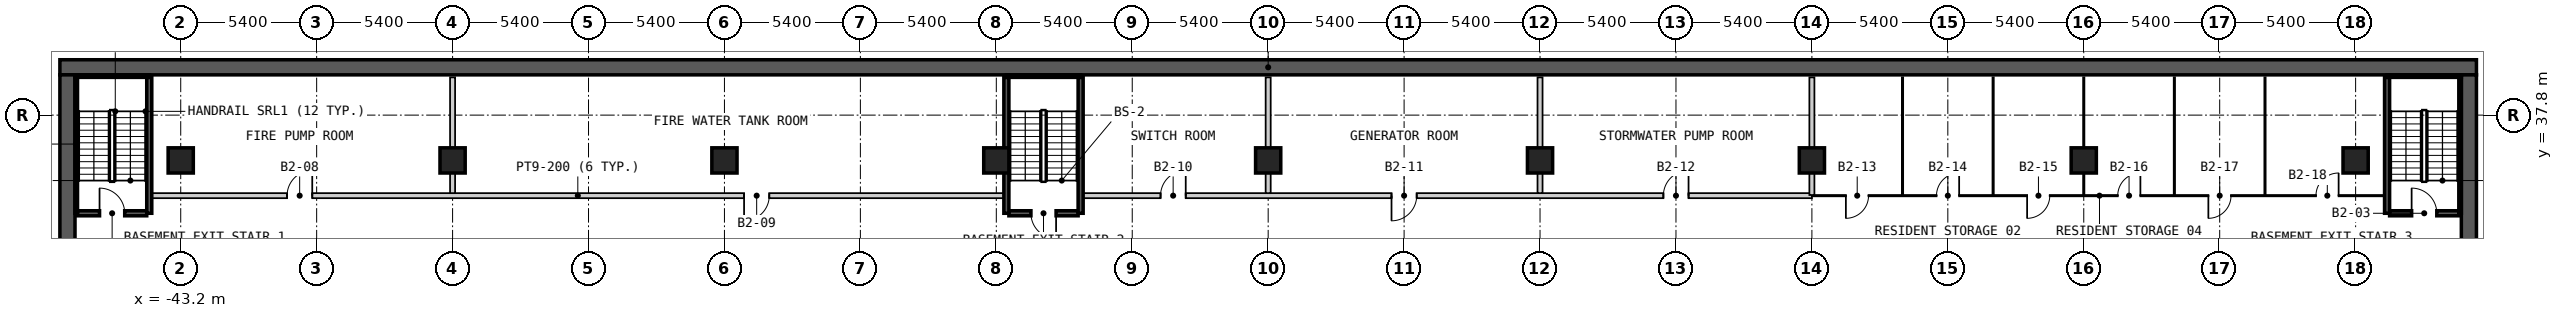
"""IFC4 building model, lengths in metres.
Left out: names, types, materials, properties, quantities, classifications, styles, units other than length and angle.
Written with IfcOpenShell. Run it as: python <this file> out.ifc"""

import sys

from ifc_helpers import new_model, si_unit, direction, frame, frame_2d, origin, origin_2d, place, context, subcontext, project, spatial, rectangle, extrude, element, fill, save


model = new_model("IFC4")
c1 = context("Model", 3, precision=1e-05, world=origin(), true_north=direction((0.0, 1.0)))
c2 = subcontext(c1, "Body", "Model", "MODEL_VIEW")
j1 = project(units=[si_unit("LENGTHUNIT", "METRE"), si_unit("PLANEANGLEUNIT", "RADIAN")], contexts=[c1])
p1 = place(None, origin())
s1 = spatial("IfcSite", under=j1, at=p1, CompositionType="ELEMENT")
p2 = place(p1, origin())
s2 = spatial("IfcBuilding", under=s1, at=p2, CompositionType="ELEMENT")
p3 = place(p2, frame((0.0, 0.0, -8.4)))
s3 = spatial("IfcBuildingStorey", under=s2, at=p3, CompositionType="ELEMENT", Elevation=-8.4)
p4 = place(p3, frame((-48.0, 39.7, -0.35), z_axis=(0.0, 0.0, 1.0), x_axis=(1.0, 0.0, 0.0)))
e1 = element("IfcWall", 1, at=p4, inside=s3, PredefinedType="SOLIDWALL", context=c2, shape_type="SweptSolid", body=[
    extrude(rectangle(XDim=96.0, YDim=0.6, at=frame_2d((48.0, 0.0))), origin(), (0.0, 0.0, 1.0), 4.55),
])
for number, where, z_axis, x_axis in (
    (2, (-47.7, -31.4, -0.35), (0.0, 0.0, 1.0), (0.0, 1.0, 0.0)),
    (3, (47.7, -31.4, -0.35), (0.0, 0.0, 1.0), (0.0, 1.0, 0.0)),
):
    element("IfcWall", number, at=place(p3, frame(where, z_axis=z_axis, x_axis=x_axis)), inside=s3, PredefinedType="SOLIDWALL", context=c2, shape_type="SweptSolid", body=[
        extrude(rectangle(XDim=70.8, YDim=0.6, at=frame_2d((35.4, 0.0))), origin(), (0.0, 0.0, 1.0), 4.55),
    ])
for number, where, z_axis, x_axis in (
    (4, (-43.2, 36.0, -0.35), (0.0, 0.0, 1.0), (1.0, 0.0, 0.0)),
    (5, (-32.4, 36.0, -0.35), (0.0, 0.0, 1.0), (1.0, 0.0, 0.0)),
    (6, (-21.6, 36.0, -0.35), (0.0, 0.0, 1.0), (1.0, 0.0, 0.0)),
    (7, (-10.8, 36.0, -0.35), (0.0, 0.0, 1.0), (1.0, 0.0, 0.0)),
    (8, (0.0, 36.0, -0.35), (0.0, 0.0, 1.0), (1.0, 0.0, 0.0)),
    (9, (10.8, 36.0, -0.35), (0.0, 0.0, 1.0), (1.0, 0.0, 0.0)),
    (10, (21.6, 36.0, -0.35), (0.0, 0.0, 1.0), (1.0, 0.0, 0.0)),
    (11, (32.4, 36.0, -0.35), (0.0, 0.0, 1.0), (1.0, 0.0, 0.0)),
    (12, (43.2, 36.0, -0.35), (0.0, 0.0, 1.0), (1.0, 0.0, 0.0)),
):
    element("IfcColumn", number, at=place(p3, frame(where, z_axis=z_axis, x_axis=x_axis)), inside=s3, PredefinedType="COLUMN", context=c2, shape_type="SweptSolid", body=[
        extrude(rectangle(XDim=1.0, YDim=1.0, at=origin_2d()), origin(), (0.0, 0.0, 1.0), 4.55),
    ])
p5 = place(p3, frame((-47.3, 33.9, 0.0), z_axis=(0.0, 0.0, 1.0), x_axis=(1.0, 0.0, 0.0)))
e13 = element("IfcWall", 13, at=p5, inside=s3, PredefinedType="SOLIDWALL", context=c2, shape_type="SweptSolid", body=[
    extrude(rectangle(XDim=2.75, YDim=0.2, at=frame_2d((1.375, 0.0))), origin(), (0.0, 0.0, 1.0), 3.85),
])
p6 = place(p5, frame((0.875, 0.0, 0.0)))
e14 = element("IfcOpeningElement", 14, at=p6, cuts=e13, PredefinedType="OPENING", context=c2, shape_type="SweptSolid", body=[
    extrude(rectangle(XDim=1.0, YDim=2.1, at=frame_2d((0.5, 1.05))), frame((0.0, 0.11, 0.0), z_axis=(0.0, -1.0, 0.0), x_axis=(1.0, 0.0, 0.0)), (0.0, 0.0, 1.0), 0.22),
])
p7 = place(p3, frame((-10.3, 33.9, 0.0), z_axis=(0.0, 0.0, 1.0), x_axis=(1.0, 0.0, 0.0)))
e15 = element("IfcWall", 15, at=p7, inside=s3, PredefinedType="SOLIDWALL", context=c2, shape_type="SweptSolid", body=[
    extrude(rectangle(XDim=2.75, YDim=0.2, at=frame_2d((1.375, 0.0))), origin(), (0.0, 0.0, 1.0), 3.85),
])
p8 = place(p7, frame((0.875, 0.0, 0.0)))
e16 = element("IfcOpeningElement", 16, at=p8, cuts=e15, PredefinedType="OPENING", context=c2, shape_type="SweptSolid", body=[
    extrude(rectangle(XDim=1.0, YDim=2.1, at=frame_2d((0.5, 1.05))), frame((0.0, 0.11, 0.0), z_axis=(0.0, -1.0, 0.0), x_axis=(1.0, 0.0, 0.0)), (0.0, 0.0, 1.0), 0.22),
])
p9 = place(p3, frame((44.55, 33.9, 0.0), z_axis=(0.0, 0.0, 1.0), x_axis=(1.0, 0.0, 0.0)))
e17 = element("IfcWall", 17, at=p9, inside=s3, PredefinedType="SOLIDWALL", context=c2, shape_type="SweptSolid", body=[
    extrude(rectangle(XDim=2.75, YDim=0.2, at=frame_2d((1.375, 0.0))), origin(), (0.0, 0.0, 1.0), 3.85),
])
p10 = place(p9, frame((0.875, 0.0, 0.0)))
e18 = element("IfcOpeningElement", 18, at=p10, cuts=e17, PredefinedType="OPENING", context=c2, shape_type="SweptSolid", body=[
    extrude(rectangle(XDim=1.0, YDim=2.1, at=frame_2d((0.5, 1.05))), frame((0.0, 0.11, 0.0), z_axis=(0.0, -1.0, 0.0), x_axis=(1.0, 0.0, 0.0)), (0.0, 0.0, 1.0), 0.22),
])
p11 = place(p3, frame((21.6, 34.6, 0.0), z_axis=(0.0, 0.0, 1.0), x_axis=(1.0, 0.0, 0.0)))
e19 = element("IfcWall", 19, at=p11, inside=s3, PredefinedType="PARTITIONING", context=c2, shape_type="SweptSolid", body=[
    extrude(rectangle(XDim=22.85, YDim=0.05, at=frame_2d((11.425, 0.0))), origin(), (0.0, 0.0, 1.0), 3.85),
])
p12 = place(p11, frame((2.25, 0.0, 0.0), z_axis=(0.0, 0.0, 1.0), x_axis=(-1.0, 0.0, 0.0)))
e20 = element("IfcOpeningElement", 20, at=p12, cuts=e19, PredefinedType="OPENING", context=c2, shape_type="SweptSolid", body=[
    extrude(rectangle(XDim=0.9, YDim=2.1, at=frame_2d((0.45, 1.05))), frame((0.0, 0.035, 0.0), z_axis=(0.0, -1.0, 0.0), x_axis=(1.0, 0.0, 0.0)), (0.0, 0.0, 1.0), 0.07),
])
p13 = place(p11, frame((5.85, 0.0, 0.0), z_axis=(0.0, 0.0, 1.0), x_axis=(-1.0, 0.0, 0.0)))
e21 = element("IfcOpeningElement", 21, at=p13, cuts=e19, PredefinedType="OPENING", context=c2, shape_type="SweptSolid", body=[
    extrude(rectangle(XDim=0.9, YDim=2.1, at=frame_2d((0.45, 1.05))), frame((0.0, 0.035, 0.0), z_axis=(0.0, -1.0, 0.0), x_axis=(1.0, 0.0, 0.0)), (0.0, 0.0, 1.0), 0.07),
])
p14 = place(p11, frame((9.45, 0.0, 0.0), z_axis=(0.0, 0.0, 1.0), x_axis=(-1.0, 0.0, 0.0)))
e22 = element("IfcOpeningElement", 22, at=p14, cuts=e19, PredefinedType="OPENING", context=c2, shape_type="SweptSolid", body=[
    extrude(rectangle(XDim=0.9, YDim=2.1, at=frame_2d((0.45, 1.05))), frame((0.0, 0.035, 0.0), z_axis=(0.0, -1.0, 0.0), x_axis=(1.0, 0.0, 0.0)), (0.0, 0.0, 1.0), 0.07),
])
p15 = place(p11, frame((13.05, 0.0, 0.0), z_axis=(0.0, 0.0, 1.0), x_axis=(-1.0, 0.0, 0.0)))
e23 = element("IfcOpeningElement", 23, at=p15, cuts=e19, PredefinedType="OPENING", context=c2, shape_type="SweptSolid", body=[
    extrude(rectangle(XDim=0.9, YDim=2.1, at=frame_2d((0.45, 1.05))), frame((0.0, 0.035, 0.0), z_axis=(0.0, -1.0, 0.0), x_axis=(1.0, 0.0, 0.0)), (0.0, 0.0, 1.0), 0.07),
])
p16 = place(p11, frame((16.65, 0.0, 0.0), z_axis=(0.0, 0.0, 1.0), x_axis=(-1.0, 0.0, 0.0)))
e24 = element("IfcOpeningElement", 24, at=p16, cuts=e19, PredefinedType="OPENING", context=c2, shape_type="SweptSolid", body=[
    extrude(rectangle(XDim=0.9, YDim=2.1, at=frame_2d((0.45, 1.05))), frame((0.0, 0.035, 0.0), z_axis=(0.0, -1.0, 0.0), x_axis=(1.0, 0.0, 0.0)), (0.0, 0.0, 1.0), 0.07),
])
p17 = place(p11, frame((20.925, 0.0, 0.0), z_axis=(0.0, 0.0, 1.0), x_axis=(-1.0, 0.0, 0.0)))
e25 = element("IfcOpeningElement", 25, at=p17, cuts=e19, PredefinedType="OPENING", context=c2, shape_type="SweptSolid", body=[
    extrude(rectangle(XDim=0.9, YDim=2.1, at=frame_2d((0.45, 1.05))), frame((0.0, 0.035, 0.0), z_axis=(0.0, -1.0, 0.0), x_axis=(1.0, 0.0, 0.0)), (0.0, 0.0, 1.0), 0.07),
])
p18 = place(p3, frame((-44.55, 34.6, 0.0), z_axis=(0.0, 0.0, 1.0), x_axis=(1.0, 0.0, 0.0)))
e26 = element("IfcWall", 26, at=p18, inside=s3, PredefinedType="SOLIDWALL", context=c2, shape_type="SweptSolid", body=[
    extrude(rectangle(XDim=34.25, YDim=0.2, at=frame_2d((17.125, 0.0))), origin(), (0.0, 0.0, 1.0), 3.85),
])
p19 = place(p18, frame((6.575, 0.0, 0.0), z_axis=(0.0, 0.0, 1.0), x_axis=(-1.0, 0.0, 0.0)))
e27 = element("IfcOpeningElement", 27, at=p19, cuts=e26, PredefinedType="OPENING", context=c2, shape_type="SweptSolid", body=[
    extrude(rectangle(XDim=1.0, YDim=2.1, at=frame_2d((0.5, 1.05))), frame((0.0, 0.11, 0.0), z_axis=(0.0, -1.0, 0.0), x_axis=(1.0, 0.0, 0.0)), (0.0, 0.0, 1.0), 0.22),
])
p20 = place(p18, frame((24.73, 0.0, 0.0), z_axis=(0.0, 0.0, 1.0), x_axis=(-1.0, 0.0, 0.0)))
e28 = element("IfcOpeningElement", 28, at=p20, cuts=e26, PredefinedType="OPENING", context=c2, shape_type="SweptSolid", body=[
    extrude(rectangle(XDim=1.0, YDim=2.1, at=frame_2d((0.5, 1.05))), frame((0.0, 0.11, 0.0), z_axis=(0.0, -1.0, 0.0), x_axis=(1.0, 0.0, 0.0)), (0.0, 0.0, 1.0), 0.22),
])
p21 = place(p3, frame((-7.55, 34.6, 0.0), z_axis=(0.0, 0.0, 1.0), x_axis=(1.0, 0.0, 0.0)))
e29 = element("IfcWall", 29, at=p21, inside=s3, PredefinedType="SOLIDWALL", context=c2, shape_type="SweptSolid", body=[
    extrude(rectangle(XDim=29.15, YDim=0.2, at=frame_2d((14.575, 0.0))), origin(), (0.0, 0.0, 1.0), 3.85),
])
p22 = place(p21, frame((4.275, 0.0, 0.0), z_axis=(0.0, 0.0, 1.0), x_axis=(-1.0, 0.0, 0.0)))
e30 = element("IfcOpeningElement", 30, at=p22, cuts=e29, PredefinedType="OPENING", context=c2, shape_type="SweptSolid", body=[
    extrude(rectangle(XDim=1.0, YDim=2.1, at=frame_2d((0.5, 1.05))), frame((0.0, 0.11, 0.0), z_axis=(0.0, -1.0, 0.0), x_axis=(1.0, 0.0, 0.0)), (0.0, 0.0, 1.0), 0.22),
])
p23 = place(p21, frame((13.45, 0.0, 0.0), z_axis=(0.0, 0.0, 1.0), x_axis=(-1.0, 0.0, 0.0)))
e31 = element("IfcOpeningElement", 31, at=p23, cuts=e29, PredefinedType="OPENING", context=c2, shape_type="SweptSolid", body=[
    extrude(rectangle(XDim=1.0, YDim=2.1, at=frame_2d((0.5, 1.05))), frame((0.0, 0.11, 0.0), z_axis=(0.0, -1.0, 0.0), x_axis=(1.0, 0.0, 0.0)), (0.0, 0.0, 1.0), 0.22),
])
p24 = place(p21, frame((24.25, 0.0, 0.0), z_axis=(0.0, 0.0, 1.0), x_axis=(-1.0, 0.0, 0.0)))
e32 = element("IfcOpeningElement", 32, at=p24, cuts=e29, PredefinedType="OPENING", context=c2, shape_type="SweptSolid", body=[
    extrude(rectangle(XDim=1.0, YDim=2.1, at=frame_2d((0.5, 1.05))), frame((0.0, 0.11, 0.0), z_axis=(0.0, -1.0, 0.0), x_axis=(1.0, 0.0, 0.0)), (0.0, 0.0, 1.0), 0.22),
])
p25 = place(p3, frame((-44.45, 33.9, 0.0), z_axis=(0.0, 0.0, 1.0), x_axis=(0.0, 1.0, 0.0)))
e33 = element("IfcWall", 33, at=p25, inside=s3, PredefinedType="SOLIDWALL", context=c2, shape_type="SweptSolid", body=[
    extrude(rectangle(XDim=5.4, YDim=0.2, at=frame_2d((2.7, 0.0))), origin(), (0.0, 0.0, 1.0), 3.85),
])
p26 = place(p3, frame((-32.4, 34.7, 0.0), z_axis=(0.0, 0.0, 1.0), x_axis=(0.0, 1.0, 0.0)))
e34 = element("IfcWall", 34, at=p26, inside=s3, PredefinedType="SOLIDWALL", context=c2, shape_type="SweptSolid", body=[
    extrude(rectangle(XDim=4.6, YDim=0.2, at=frame_2d((2.3, 0.0))), origin(), (0.0, 0.0, 1.0), 3.85),
])
for number, where, z_axis, x_axis in (
    (35, (-10.4, 33.9, 0.0), (0.0, 0.0, 1.0), (0.0, 1.0, 0.0)),
    (36, (-7.45, 33.9, 0.0), (0.0, 0.0, 1.0), (0.0, 1.0, 0.0)),
):
    element("IfcWall", number, at=place(p3, frame(where, z_axis=z_axis, x_axis=x_axis)), inside=s3, PredefinedType="SOLIDWALL", context=c2, shape_type="SweptSolid", body=[
        extrude(rectangle(XDim=5.4, YDim=0.2, at=frame_2d((2.7, 0.0))), origin(), (0.0, 0.0, 1.0), 3.85),
    ])
for number, where, z_axis, x_axis in (
    (37, (0.0, 34.7, 0.0), (0.0, 0.0, 1.0), (0.0, 1.0, 0.0)),
    (38, (10.8, 34.7, 0.0), (0.0, 0.0, 1.0), (0.0, 1.0, 0.0)),
):
    element("IfcWall", number, at=place(p3, frame(where, z_axis=z_axis, x_axis=x_axis)), inside=s3, PredefinedType="SOLIDWALL", context=c2, shape_type="SweptSolid", body=[
        extrude(rectangle(XDim=4.6, YDim=0.2, at=frame_2d((2.3, 0.0))), origin(), (0.0, 0.0, 1.0), 3.85),
    ])
p27 = place(p3, frame((21.6, 34.625, 0.0), z_axis=(0.0, 0.0, 1.0), x_axis=(0.0, 1.0, 0.0)))
e39 = element("IfcWall", 39, at=p27, inside=s3, PredefinedType="SOLIDWALL", context=c2, shape_type="SweptSolid", body=[
    extrude(rectangle(XDim=4.675, YDim=0.2, at=frame_2d((2.337, 0.0))), origin(), (0.0, 0.0, 1.0), 3.85),
])
for number, where, z_axis, x_axis in (
    (40, (25.2, 34.625, 0.0), (0.0, 0.0, 1.0), (0.0, 1.0, 0.0)),
    (41, (28.8, 34.625, 0.0), (0.0, 0.0, 1.0), (0.0, 1.0, 0.0)),
    (42, (32.4, 34.625, 0.0), (0.0, 0.0, 1.0), (0.0, 1.0, 0.0)),
    (43, (36.0, 34.625, 0.0), (0.0, 0.0, 1.0), (0.0, 1.0, 0.0)),
    (44, (39.6, 34.625, 0.0), (0.0, 0.0, 1.0), (0.0, 1.0, 0.0)),
):
    element("IfcWall", number, at=place(p3, frame(where, z_axis=z_axis, x_axis=x_axis)), inside=s3, PredefinedType="PARTITIONING", context=c2, shape_type="SweptSolid", body=[
        extrude(rectangle(XDim=4.675, YDim=0.05, at=frame_2d((2.337, 0.0))), origin(), (0.0, 0.0, 1.0), 3.85),
    ])
p28 = place(p3, frame((44.45, 33.9, 0.0), z_axis=(0.0, 0.0, 1.0), x_axis=(0.0, 1.0, 0.0)))
e45 = element("IfcWall", 45, at=p28, inside=s3, PredefinedType="SOLIDWALL", context=c2, shape_type="SweptSolid", body=[
    extrude(rectangle(XDim=5.4, YDim=0.2, at=frame_2d((2.7, 0.0))), origin(), (0.0, 0.0, 1.0), 3.85),
])
p29 = place(p3, frame((-47.35, 33.9, 0.0), z_axis=(0.0, 0.0, 1.0), x_axis=(0.0, 1.0, 0.0)))
e46 = element("IfcWall", 46, at=p29, inside=s3, PredefinedType="SOLIDWALL", context=c2, shape_type="SweptSolid", body=[
    extrude(rectangle(XDim=5.5, YDim=0.1, at=frame_2d((2.75, 0.0))), origin(), (0.0, 0.0, 1.0), 3.85),
])
for number, where, z_axis, x_axis in (
    (47, (-47.4, 39.35, 0.0), (0.0, 0.0, 1.0), (1.0, 0.0, 0.0)),
    (48, (-10.4, 39.35, 0.0), (0.0, 0.0, 1.0), (1.0, 0.0, 0.0)),
):
    element("IfcWall", number, at=place(p3, frame(where, z_axis=z_axis, x_axis=x_axis)), inside=s3, PredefinedType="SOLIDWALL", context=c2, shape_type="SweptSolid", body=[
        extrude(rectangle(XDim=2.95, YDim=0.1, at=frame_2d((1.475, 0.0))), origin(), (0.0, 0.0, 1.0), 3.85),
    ])
p30 = place(p3, frame((47.35, 33.9, 0.0), z_axis=(0.0, 0.0, 1.0), x_axis=(0.0, 1.0, 0.0)))
e49 = element("IfcWall", 49, at=p30, inside=s3, PredefinedType="SOLIDWALL", context=c2, shape_type="SweptSolid", body=[
    extrude(rectangle(XDim=5.5, YDim=0.1, at=frame_2d((2.75, 0.0))), origin(), (0.0, 0.0, 1.0), 3.85),
])
p31 = place(p3, frame((44.45, 39.35, 0.0), z_axis=(0.0, 0.0, 1.0), x_axis=(1.0, 0.0, 0.0)))
e50 = element("IfcWall", 50, at=p31, inside=s3, PredefinedType="SOLIDWALL", context=c2, shape_type="SweptSolid", body=[
    extrude(rectangle(XDim=2.95, YDim=0.1, at=frame_2d((1.475, 0.0))), origin(), (0.0, 0.0, 1.0), 3.85),
])
p32 = place(p6, origin())
e51 = element("IfcDoor", 51, at=p32, inside=s3, OperationType="SINGLE_SWING_LEFT", PredefinedType="DOOR", context=c2, shape_type="SweptSolid", body=[
    extrude(rectangle(XDim=1.0, YDim=2.1, at=frame_2d((0.5, 1.05))), frame((0.0, 0.025, 0.0), z_axis=(0.0, -1.0, 0.0), x_axis=(1.0, 0.0, 0.0)), (0.0, 0.0, 1.0), 0.05),
])
fill(e14, e51)
p33 = place(p8, origin())
e52 = element("IfcDoor", 52, at=p33, inside=s3, OperationType="SINGLE_SWING_RIGHT", PredefinedType="DOOR", context=c2, shape_type="SweptSolid", body=[
    extrude(rectangle(XDim=1.0, YDim=2.1, at=frame_2d((0.5, 1.05))), frame((0.0, 0.025, 0.0), z_axis=(0.0, -1.0, 0.0), x_axis=(1.0, 0.0, 0.0)), (0.0, 0.0, 1.0), 0.05),
])
fill(e16, e52)
p34 = place(p10, origin())
e53 = element("IfcDoor", 53, at=p34, inside=s3, OperationType="SINGLE_SWING_LEFT", PredefinedType="DOOR", context=c2, shape_type="SweptSolid", body=[
    extrude(rectangle(XDim=1.0, YDim=2.1, at=frame_2d((0.5, 1.05))), frame((0.0, 0.025, 0.0), z_axis=(0.0, -1.0, 0.0), x_axis=(1.0, 0.0, 0.0)), (0.0, 0.0, 1.0), 0.05),
])
fill(e18, e53)
p35 = place(p19, origin())
e54 = element("IfcDoor", 54, at=p35, inside=s3, OperationType="SINGLE_SWING_LEFT", PredefinedType="DOOR", context=c2, shape_type="SweptSolid", body=[
    extrude(rectangle(XDim=1.0, YDim=2.1, at=frame_2d((0.5, 1.05))), frame((0.0, 0.025, 0.0), z_axis=(0.0, -1.0, 0.0), x_axis=(1.0, 0.0, 0.0)), (0.0, 0.0, 1.0), 0.05),
])
fill(e27, e54)
p36 = place(p20, origin())
e55 = element("IfcDoor", 55, at=p36, inside=s3, OperationType="SINGLE_SWING_RIGHT", PredefinedType="DOOR", context=c2, shape_type="SweptSolid", body=[
    extrude(rectangle(XDim=1.0, YDim=2.1, at=frame_2d((0.5, 1.05))), frame((0.0, 0.025, 0.0), z_axis=(0.0, -1.0, 0.0), x_axis=(1.0, 0.0, 0.0)), (0.0, 0.0, 1.0), 0.05),
])
fill(e28, e55)
p37 = place(p22, origin())
e56 = element("IfcDoor", 56, at=p37, inside=s3, OperationType="SINGLE_SWING_LEFT", PredefinedType="DOOR", context=c2, shape_type="SweptSolid", body=[
    extrude(rectangle(XDim=1.0, YDim=2.1, at=frame_2d((0.5, 1.05))), frame((0.0, 0.025, 0.0), z_axis=(0.0, -1.0, 0.0), x_axis=(1.0, 0.0, 0.0)), (0.0, 0.0, 1.0), 0.05),
])
fill(e30, e56)
p38 = place(p23, origin())
e57 = element("IfcDoor", 57, at=p38, inside=s3, OperationType="SINGLE_SWING_RIGHT", PredefinedType="DOOR", context=c2, shape_type="SweptSolid", body=[
    extrude(rectangle(XDim=1.0, YDim=2.1, at=frame_2d((0.5, 1.05))), frame((0.0, 0.025, 0.0), z_axis=(0.0, -1.0, 0.0), x_axis=(1.0, 0.0, 0.0)), (0.0, 0.0, 1.0), 0.05),
])
fill(e31, e57)
p39 = place(p24, origin())
e58 = element("IfcDoor", 58, at=p39, inside=s3, OperationType="SINGLE_SWING_LEFT", PredefinedType="DOOR", context=c2, shape_type="SweptSolid", body=[
    extrude(rectangle(XDim=1.0, YDim=2.1, at=frame_2d((0.5, 1.05))), frame((0.0, 0.025, 0.0), z_axis=(0.0, -1.0, 0.0), x_axis=(1.0, 0.0, 0.0)), (0.0, 0.0, 1.0), 0.05),
])
fill(e32, e58)
p40 = place(p12, origin())
e59 = element("IfcDoor", 59, at=p40, inside=s3, OperationType="SINGLE_SWING_RIGHT", PredefinedType="DOOR", context=c2, shape_type="SweptSolid", body=[
    extrude(rectangle(XDim=0.9, YDim=2.1, at=frame_2d((0.45, 1.05))), frame((0.0, 0.025, 0.0), z_axis=(0.0, -1.0, 0.0), x_axis=(1.0, 0.0, 0.0)), (0.0, 0.0, 1.0), 0.05),
])
fill(e20, e59)
p41 = place(p13, origin())
e60 = element("IfcDoor", 60, at=p41, inside=s3, OperationType="SINGLE_SWING_LEFT", PredefinedType="DOOR", context=c2, shape_type="SweptSolid", body=[
    extrude(rectangle(XDim=0.9, YDim=2.1, at=frame_2d((0.45, 1.05))), frame((0.0, 0.025, 0.0), z_axis=(0.0, -1.0, 0.0), x_axis=(1.0, 0.0, 0.0)), (0.0, 0.0, 1.0), 0.05),
])
fill(e21, e60)
p42 = place(p14, origin())
e61 = element("IfcDoor", 61, at=p42, inside=s3, OperationType="SINGLE_SWING_RIGHT", PredefinedType="DOOR", context=c2, shape_type="SweptSolid", body=[
    extrude(rectangle(XDim=0.9, YDim=2.1, at=frame_2d((0.45, 1.05))), frame((0.0, 0.025, 0.0), z_axis=(0.0, -1.0, 0.0), x_axis=(1.0, 0.0, 0.0)), (0.0, 0.0, 1.0), 0.05),
])
fill(e22, e61)
p43 = place(p15, origin())
e62 = element("IfcDoor", 62, at=p43, inside=s3, OperationType="SINGLE_SWING_LEFT", PredefinedType="DOOR", context=c2, shape_type="SweptSolid", body=[
    extrude(rectangle(XDim=0.9, YDim=2.1, at=frame_2d((0.45, 1.05))), frame((0.0, 0.025, 0.0), z_axis=(0.0, -1.0, 0.0), x_axis=(1.0, 0.0, 0.0)), (0.0, 0.0, 1.0), 0.05),
])
fill(e23, e62)
p44 = place(p16, origin())
e63 = element("IfcDoor", 63, at=p44, inside=s3, OperationType="SINGLE_SWING_RIGHT", PredefinedType="DOOR", context=c2, shape_type="SweptSolid", body=[
    extrude(rectangle(XDim=0.9, YDim=2.1, at=frame_2d((0.45, 1.05))), frame((0.0, 0.025, 0.0), z_axis=(0.0, -1.0, 0.0), x_axis=(1.0, 0.0, 0.0)), (0.0, 0.0, 1.0), 0.05),
])
fill(e24, e63)
p45 = place(p17, origin())
e64 = element("IfcDoor", 64, at=p45, inside=s3, OperationType="SINGLE_SWING_LEFT", PredefinedType="DOOR", context=c2, shape_type="SweptSolid", body=[
    extrude(rectangle(XDim=0.9, YDim=2.1, at=frame_2d((0.45, 1.05))), frame((0.0, 0.025, 0.0), z_axis=(0.0, -1.0, 0.0), x_axis=(1.0, 0.0, 0.0)), (0.0, 0.0, 1.0), 0.05),
])
fill(e25, e64)
save(model, sys.argv[1])
